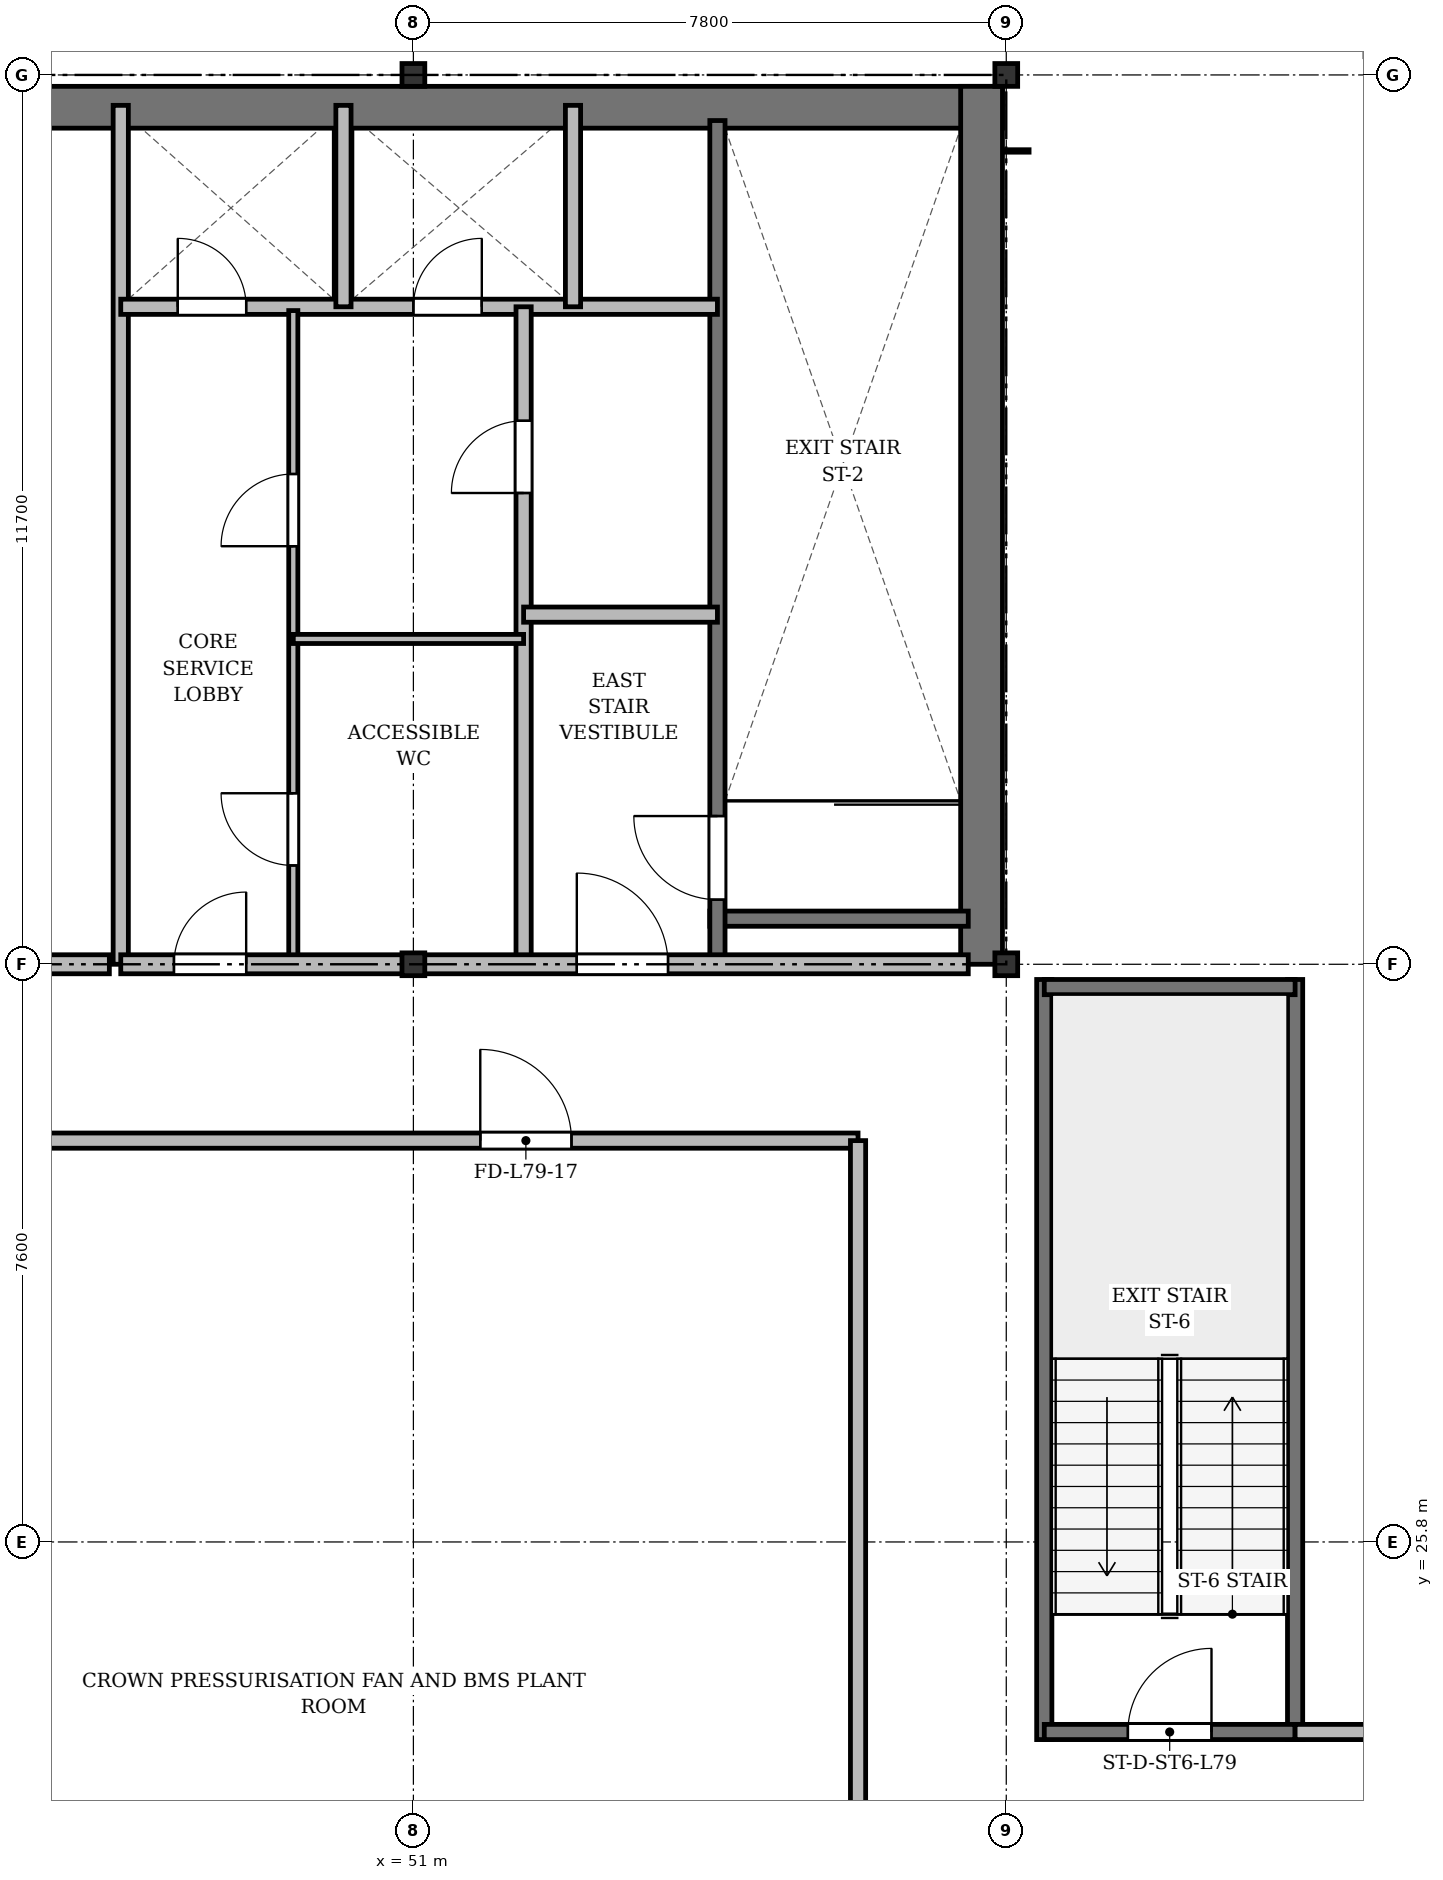
"""IFC4 building model, lengths in metres.
Left out: names, types, materials, properties, quantities, classifications, styles, units other than length and angle.
Written with IfcOpenShell. Run it as: python <this file> out.ifc"""

import sys

from ifc_helpers import new_model, si_unit, direction, frame, frame_2d, origin, origin_2d, place, context, subcontext, project, spatial, rectangle, i_section, extrude, source, transform, mapped, element, fill, save


model = new_model("IFC4")
c1 = context("Model", 3, precision=1e-05, world=origin(), true_north=direction((0.0, 1.0)))
c2 = subcontext(c1, "Body", "Model", "MODEL_VIEW")
j1 = project(units=[si_unit("LENGTHUNIT", "METRE"), si_unit("PLANEANGLEUNIT", "RADIAN")], contexts=[c1])
p1 = place(None, origin())
s1 = spatial("IfcSite", under=j1, at=p1, CompositionType="ELEMENT")
p2 = place(p1, origin())
s2 = spatial("IfcBuilding", under=s1, at=p2, CompositionType="ELEMENT")
p3 = place(p2, frame((0.0, 0.0, 303.5)))
s3 = spatial("IfcBuildingStorey", under=s2, at=p3, CompositionType="ELEMENT", Elevation=303.5)
m1 = source(origin(), c2, "Body", "SweptSolid", [
    extrude(i_section(OverallWidth=0.3, OverallDepth=0.3, WebThickness=0.015, FlangeThickness=0.024, at=origin_2d()), origin(), (0.0, 0.0, 1.0), 4.4),
])
for number, where, z_axis, x_axis in (
    (1, (51.0, 33.4, 0.0), (0.0, 0.0, 1.0), (1.0, 0.0, 0.0)),
    (2, (51.0, 45.1, 0.0), (0.0, 0.0, 1.0), (1.0, 0.0, 0.0)),
    (3, (58.8, 33.4, 0.0), (0.0, 0.0, 1.0), (1.0, 0.0, 0.0)),
    (4, (58.8, 45.1, 0.0), (0.0, 0.0, 1.0), (1.0, 0.0, 0.0)),
):
    element("IfcColumn", number, at=place(p3, frame(where, z_axis=z_axis, x_axis=x_axis)), inside=s3, PredefinedType="COLUMN", context=c2, shape_type="MappedRepresentation", body=[
        mapped(m1, transform((0.0, 0.0, 0.0), x_axis=(1.0, 0.0, 0.0), y_axis=(0.0, 1.0, 0.0), z_axis=(0.0, 0.0, 1.0), scale=1.0)),
    ])
p4 = place(p3, frame((15.65, 44.675, 0.0), z_axis=(0.0, 0.0, 1.0), x_axis=(1.0, 0.0, 0.0)))
e5 = element("IfcWall", 5, at=p4, inside=s3, PredefinedType="SHEAR", context=c2, shape_type="SweptSolid", body=[
    extrude(rectangle(XDim=43.1, YDim=0.55, at=frame_2d((21.55, 0.0))), origin(), (0.0, 0.0, 1.0), 4.1),
])
p5 = place(p3, frame((58.475, 33.4, 0.0), z_axis=(0.0, 0.0, 1.0), x_axis=(0.0, 1.0, 0.0)))
e6 = element("IfcWall", 6, at=p5, inside=s3, PredefinedType="SHEAR", context=c2, shape_type="SweptSolid", body=[
    extrude(rectangle(XDim=11.55, YDim=0.55, at=frame_2d((5.775, 0.0))), origin(), (0.0, 0.0, 1.0), 4.1),
])
p6 = place(p3, frame((54.9, 34.0, 0.0), z_axis=(0.0, 0.0, 1.0), x_axis=(1.0, 0.0, 0.0)))
e7 = element("IfcWall", 7, at=p6, inside=s3, PredefinedType="SHEAR", context=c2, shape_type="SweptSolid", body=[
    extrude(rectangle(XDim=3.4, YDim=0.2, at=frame_2d((1.7, 0.0))), origin(), (0.0, 0.0, 1.0), 4.1),
])
p7 = place(p3, frame((55.0, 33.4, 0.0), z_axis=(0.0, 0.0, 1.0), x_axis=(0.0, 1.0, 0.0)))
e8 = element("IfcWall", 8, at=p7, inside=s3, PredefinedType="SHEAR", context=c2, shape_type="SweptSolid", body=[
    extrude(rectangle(XDim=11.1, YDim=0.2, at=frame_2d((5.55, 0.0))), origin(), (0.0, 0.0, 1.0), 4.1),
])
p8 = place(p7, frame((0.85, 0.0, 0.0)))
e9 = element("IfcOpeningElement", 9, at=p8, cuts=e8, PredefinedType="OPENING", context=c2, shape_type="SweptSolid", body=[
    extrude(rectangle(XDim=1.1, YDim=2.15, at=frame_2d((0.55, 1.075))), frame((0.0, 0.11, 0.0), z_axis=(0.0, -1.0, 0.0), x_axis=(1.0, 0.0, 0.0)), (0.0, 0.0, 1.0), 0.22),
])
for number, where, z_axis, x_axis in (
    (10, (59.3, 23.2, 0.0), (0.0, 0.0, 1.0), (0.0, 1.0, 0.0)),
    (11, (62.6, 23.2, 0.0), (0.0, 0.0, 1.0), (0.0, 1.0, 0.0)),
):
    element("IfcWall", number, at=place(p3, frame(where, z_axis=z_axis, x_axis=x_axis)), inside=s3, PredefinedType="SHEAR", context=c2, shape_type="SweptSolid", body=[
        extrude(rectangle(XDim=10.0, YDim=0.2, at=frame_2d((5.0, 0.0))), origin(), (0.0, 0.0, 1.0), 4.1),
    ])
p9 = place(p3, frame((59.3, 33.1, 0.0), z_axis=(0.0, 0.0, 1.0), x_axis=(1.0, 0.0, 0.0)))
e12 = element("IfcWall", 12, at=p9, inside=s3, PredefinedType="SHEAR", context=c2, shape_type="SweptSolid", body=[
    extrude(rectangle(XDim=3.3, YDim=0.2, at=frame_2d((1.65, 0.0))), origin(), (0.0, 0.0, 1.0), 4.1),
])
p10 = place(p3, frame((59.3, 23.3, 0.0), z_axis=(0.0, 0.0, 1.0), x_axis=(1.0, 0.0, 0.0)))
e13 = element("IfcWall", 13, at=p10, inside=s3, PredefinedType="SHEAR", context=c2, shape_type="SweptSolid", body=[
    extrude(rectangle(XDim=3.3, YDim=0.2, at=frame_2d((1.65, 0.0))), origin(), (0.0, 0.0, 1.0), 4.1),
])
p11 = place(p10, frame((1.1, 0.0, 0.0)))
e14 = element("IfcOpeningElement", 14, at=p11, cuts=e13, PredefinedType="OPENING", context=c2, shape_type="SweptSolid", body=[
    extrude(rectangle(XDim=1.1, YDim=2.15, at=frame_2d((0.55, 1.075))), frame((0.0, 0.11, 0.0), z_axis=(0.0, -1.0, 0.0), x_axis=(1.0, 0.0, 0.0)), (0.0, 0.0, 1.0), 0.22),
])
p12 = place(p3, frame((26.3, 33.4, 0.0), z_axis=(0.0, 0.0, 1.0), x_axis=(1.0, 0.0, 0.0)))
e15 = element("IfcWall", 15, at=p12, inside=s3, PredefinedType="PARTITIONING", context=c2, shape_type="SweptSolid", body=[
    extrude(rectangle(XDim=20.7, YDim=0.25, at=frame_2d((10.35, 0.0))), origin(), (0.0, 0.0, 1.0), 3.6),
])
p13 = place(p12, frame((2.0, 0.0, 0.0)))
e16 = element("IfcOpeningElement", 16, at=p13, cuts=e15, PredefinedType="OPENING", context=c2, shape_type="SweptSolid", body=[
    extrude(rectangle(XDim=1.6, YDim=2.2, at=frame_2d((0.8, 1.1))), frame((0.0, 0.135, 0.0), z_axis=(0.0, -1.0, 0.0), x_axis=(1.0, 0.0, 0.0)), (0.0, 0.0, 1.0), 0.27),
])
p14 = place(p3, frame((47.15, 33.4, 0.0), z_axis=(0.0, 0.0, 1.0), x_axis=(0.0, 1.0, 0.0)))
e17 = element("IfcWall", 17, at=p14, inside=s3, PredefinedType="SOLIDWALL", context=c2, shape_type="SweptSolid", body=[
    extrude(rectangle(XDim=11.3, YDim=0.2, at=frame_2d((5.65, 0.0))), origin(), (0.0, 0.0, 1.0), 3.6),
])
p15 = place(p3, frame((47.15, 42.05, 0.0), z_axis=(0.0, 0.0, 1.0), x_axis=(1.0, 0.0, 0.0)))
e18 = element("IfcWall", 18, at=p15, inside=s3, PredefinedType="SOLIDWALL", context=c2, shape_type="SweptSolid", body=[
    extrude(rectangle(XDim=7.85, YDim=0.2, at=frame_2d((3.925, 0.0))), origin(), (0.0, 0.0, 1.0), 3.6),
])
p16 = place(p15, frame((0.75, 0.0, 0.0)))
e19 = element("IfcOpeningElement", 19, at=p16, cuts=e18, PredefinedType="OPENING", context=c2, shape_type="SweptSolid", body=[
    extrude(rectangle(XDim=0.9, YDim=2.1, at=frame_2d((0.45, 1.05))), frame((0.0, 0.11, 0.0), z_axis=(0.0, -1.0, 0.0), x_axis=(1.0, 0.0, 0.0)), (0.0, 0.0, 1.0), 0.22),
])
p17 = place(p15, frame((3.85, 0.0, 0.0)))
e20 = element("IfcOpeningElement", 20, at=p17, cuts=e18, PredefinedType="OPENING", context=c2, shape_type="SweptSolid", body=[
    extrude(rectangle(XDim=0.9, YDim=2.1, at=frame_2d((0.45, 1.05))), frame((0.0, 0.11, 0.0), z_axis=(0.0, -1.0, 0.0), x_axis=(1.0, 0.0, 0.0)), (0.0, 0.0, 1.0), 0.22),
])
for number, where, z_axis, x_axis in (
    (21, (50.08, 42.05, 0.0), (0.0, 0.0, 1.0), (0.0, 1.0, 0.0)),
    (22, (53.1, 42.05, 0.0), (0.0, 0.0, 1.0), (0.0, 1.0, 0.0)),
):
    element("IfcWall", number, at=place(p3, frame(where, z_axis=z_axis, x_axis=x_axis)), inside=s3, PredefinedType="SOLIDWALL", context=c2, shape_type="SweptSolid", body=[
        extrude(rectangle(XDim=2.65, YDim=0.2, at=frame_2d((1.325, 0.0))), origin(), (0.0, 0.0, 1.0), 4.1),
    ])
p18 = place(p3, frame((52.45, 33.4, 0.0), z_axis=(0.0, 0.0, 1.0), x_axis=(0.0, 1.0, 0.0)))
e23 = element("IfcWall", 23, at=p18, inside=s3, PredefinedType="PARTITIONING", context=c2, shape_type="SweptSolid", body=[
    extrude(rectangle(XDim=8.65, YDim=0.2, at=frame_2d((4.325, 0.0))), origin(), (0.0, 0.0, 1.0), 3.6),
])
p19 = place(p18, frame((6.2, 0.0, 0.0)))
e24 = element("IfcOpeningElement", 24, at=p19, cuts=e23, PredefinedType="OPENING", context=c2, shape_type="SweptSolid", body=[
    extrude(rectangle(XDim=0.95, YDim=2.15, at=frame_2d((0.475, 1.075))), frame((0.0, 0.11, 0.0), z_axis=(0.0, -1.0, 0.0), x_axis=(1.0, 0.0, 0.0)), (0.0, 0.0, 1.0), 0.22),
])
p20 = place(p3, frame((52.45, 38.0, 0.0), z_axis=(0.0, 0.0, 1.0), x_axis=(1.0, 0.0, 0.0)))
e25 = element("IfcWall", 25, at=p20, inside=s3, PredefinedType="PARTITIONING", context=c2, shape_type="SweptSolid", body=[
    extrude(rectangle(XDim=2.55, YDim=0.2, at=frame_2d((1.275, 0.0))), origin(), (0.0, 0.0, 1.0), 4.1),
])
p21 = place(p3, frame((49.42, 33.4, 0.0), z_axis=(0.0, 0.0, 1.0), x_axis=(0.0, 1.0, 0.0)))
e26 = element("IfcWall", 26, at=p21, inside=s3, PredefinedType="PARTITIONING", context=c2, shape_type="SweptSolid", body=[
    extrude(rectangle(XDim=8.6, YDim=0.12, at=frame_2d((4.3, 0.0))), origin(), (0.0, 0.0, 1.0), 3.6),
])
p22 = place(p21, frame((1.3, 0.0, 0.0)))
e27 = element("IfcOpeningElement", 27, at=p22, cuts=e26, PredefinedType="OPENING", context=c2, shape_type="SweptSolid", body=[
    extrude(rectangle(XDim=0.95, YDim=2.15, at=frame_2d((0.475, 1.075))), frame((0.0, 0.07, 0.0), z_axis=(0.0, -1.0, 0.0), x_axis=(1.0, 0.0, 0.0)), (0.0, 0.0, 1.0), 0.14),
])
p23 = place(p21, frame((5.5, 0.0, 0.0)))
e28 = element("IfcOpeningElement", 28, at=p23, cuts=e26, PredefinedType="OPENING", context=c2, shape_type="SweptSolid", body=[
    extrude(rectangle(XDim=0.95, YDim=2.15, at=frame_2d((0.475, 1.075))), frame((0.0, 0.07, 0.0), z_axis=(0.0, -1.0, 0.0), x_axis=(1.0, 0.0, 0.0)), (0.0, 0.0, 1.0), 0.14),
])
p24 = place(p3, frame((49.42, 37.68, 0.0), z_axis=(0.0, 0.0, 1.0), x_axis=(1.0, 0.0, 0.0)))
e29 = element("IfcWall", 29, at=p24, inside=s3, PredefinedType="PARTITIONING", context=c2, shape_type="SweptSolid", body=[
    extrude(rectangle(XDim=3.03, YDim=0.12, at=frame_2d((1.515, 0.0))), origin(), (0.0, 0.0, 1.0), 3.6),
])
p25 = place(p3, frame((47.15, 33.4, 0.0), z_axis=(0.0, 0.0, 1.0), x_axis=(1.0, 0.0, 0.0)))
e30 = element("IfcWall", 30, at=p25, inside=s3, PredefinedType="PARTITIONING", context=c2, shape_type="SweptSolid", body=[
    extrude(rectangle(XDim=11.15, YDim=0.25, at=frame_2d((5.575, 0.0))), origin(), (0.0, 0.0, 1.0), 3.6),
])
p26 = place(p25, frame((0.7, 0.0, 0.0)))
e31 = element("IfcOpeningElement", 31, at=p26, cuts=e30, PredefinedType="OPENING", context=c2, shape_type="SweptSolid", body=[
    extrude(rectangle(XDim=0.95, YDim=2.15, at=frame_2d((0.475, 1.075))), frame((0.0, 0.135, 0.0), z_axis=(0.0, -1.0, 0.0), x_axis=(1.0, 0.0, 0.0)), (0.0, 0.0, 1.0), 0.27),
])
p27 = place(p25, frame((6.0, 0.0, 0.0)))
e32 = element("IfcOpeningElement", 32, at=p27, cuts=e30, PredefinedType="OPENING", context=c2, shape_type="SweptSolid", body=[
    extrude(rectangle(XDim=1.2, YDim=2.15, at=frame_2d((0.6, 1.075))), frame((0.0, 0.135, 0.0), z_axis=(0.0, -1.0, 0.0), x_axis=(1.0, 0.0, 0.0)), (0.0, 0.0, 1.0), 0.27),
])
p28 = place(p3, frame((42.38, 31.08, 0.0), z_axis=(0.0, 0.0, 1.0), x_axis=(1.0, 0.0, 0.0)))
e33 = element("IfcWall", 33, at=p28, inside=s3, PredefinedType="PARTITIONING", context=c2, shape_type="SweptSolid", body=[
    extrude(rectangle(XDim=14.47, YDim=0.2, at=frame_2d((7.235, 0.0))), origin(), (0.0, 0.0, 1.0), 3.6),
])
p29 = place(p28, frame((9.5, 0.0, 0.0)))
e34 = element("IfcOpeningElement", 34, at=p29, cuts=e33, PredefinedType="OPENING", context=c2, shape_type="SweptSolid", body=[
    extrude(rectangle(XDim=1.2, YDim=2.15, at=frame_2d((0.6, 1.075))), frame((0.0, 0.11, 0.0), z_axis=(0.0, -1.0, 0.0), x_axis=(1.0, 0.0, 0.0)), (0.0, 0.0, 1.0), 0.22),
])
p30 = place(p3, frame((56.85, 15.01, 0.0), z_axis=(0.0, 0.0, 1.0), x_axis=(0.0, 1.0, 0.0)))
e35 = element("IfcWall", 35, at=p30, inside=s3, PredefinedType="PARTITIONING", context=c2, shape_type="SweptSolid", body=[
    extrude(rectangle(XDim=16.07, YDim=0.2, at=frame_2d((8.035, 0.0))), origin(), (0.0, 0.0, 1.0), 3.6),
])
p31 = place(p3, frame((62.6, 23.3, 0.0), z_axis=(0.0, 0.0, 1.0), x_axis=(1.0, 0.0, 0.0)))
e36 = element("IfcWall", 36, at=p31, inside=s3, PredefinedType="PARTITIONING", context=c2, shape_type="SweptSolid", body=[
    extrude(rectangle(XDim=3.39, YDim=0.2, at=frame_2d((1.695, 0.0))), origin(), (0.0, 0.0, 1.0), 3.6),
])
p32 = place(p31, frame((1.1, 0.0, 0.0)))
e37 = element("IfcOpeningElement", 37, at=p32, cuts=e36, PredefinedType="OPENING", context=c2, shape_type="SweptSolid", body=[
    extrude(rectangle(XDim=1.2, YDim=2.15, at=frame_2d((0.6, 1.075))), frame((0.0, 0.11, 0.0), z_axis=(0.0, -1.0, 0.0), x_axis=(1.0, 0.0, 0.0)), (0.0, 0.0, 1.0), 0.22),
])
m2 = source(origin(), c2, "Body", "SweptSolid", [
    extrude(rectangle(XDim=1.1, YDim=2.15, at=frame_2d((0.55, 1.075))), frame((0.0, 0.025, 0.0), z_axis=(0.0, -1.0, 0.0), x_axis=(1.0, 0.0, 0.0)), (0.0, 0.0, 1.0), 0.05),
])
p33 = place(p8, origin())
e38 = element("IfcDoor", 38, at=p33, inside=s3, OperationType="SINGLE_SWING_RIGHT", PredefinedType="DOOR", context=c2, shape_type="MappedRepresentation", body=[
    mapped(m2, transform((0.0, 0.0, 0.0), x_axis=(1.0, 0.0, 0.0), y_axis=(0.0, 1.0, 0.0), z_axis=(0.0, 0.0, 1.0), scale=1.0)),
])
fill(e9, e38)
p34 = place(p11, origin())
e39 = element("IfcDoor", 39, at=p34, inside=s3, OperationType="SINGLE_SWING_RIGHT", PredefinedType="DOOR", context=c2, shape_type="MappedRepresentation", body=[
    mapped(m2, transform((0.0, 0.0, 0.0), x_axis=(1.0, 0.0, 0.0), y_axis=(0.0, 1.0, 0.0), z_axis=(0.0, 0.0, 1.0), scale=1.0)),
])
fill(e14, e39)
m3 = source(origin(), c2, "Body", "SweptSolid", [
    extrude(rectangle(XDim=0.9, YDim=2.1, at=frame_2d((0.45, 1.05))), frame((0.0, 0.025, 0.0), z_axis=(0.0, -1.0, 0.0), x_axis=(1.0, 0.0, 0.0)), (0.0, 0.0, 1.0), 0.05),
])
p35 = place(p16, origin())
e40 = element("IfcDoor", 40, at=p35, inside=s3, OperationType="SINGLE_SWING_LEFT", PredefinedType="DOOR", context=c2, shape_type="MappedRepresentation", body=[
    mapped(m3, transform((0.0, 0.0, 0.0), x_axis=(1.0, 0.0, 0.0), y_axis=(0.0, 1.0, 0.0), z_axis=(0.0, 0.0, 1.0), scale=1.0)),
])
fill(e19, e40)
p36 = place(p17, origin())
e41 = element("IfcDoor", 41, at=p36, inside=s3, OperationType="SINGLE_SWING_RIGHT", PredefinedType="DOOR", context=c2, shape_type="MappedRepresentation", body=[
    mapped(m3, transform((0.0, 0.0, 0.0), x_axis=(1.0, 0.0, 0.0), y_axis=(0.0, 1.0, 0.0), z_axis=(0.0, 0.0, 1.0), scale=1.0)),
])
fill(e20, e41)
m4 = source(origin(), c2, "Body", "SweptSolid", [
    extrude(rectangle(XDim=0.95, YDim=2.15, at=frame_2d((0.475, 1.075))), frame((0.0, 0.025, 0.0), z_axis=(0.0, -1.0, 0.0), x_axis=(1.0, 0.0, 0.0)), (0.0, 0.0, 1.0), 0.05),
])
p37 = place(p19, origin())
e42 = element("IfcDoor", 42, at=p37, inside=s3, OperationType="SINGLE_SWING_LEFT", PredefinedType="DOOR", context=c2, shape_type="MappedRepresentation", body=[
    mapped(m4, transform((0.0, 0.0, 0.0), x_axis=(1.0, 0.0, 0.0), y_axis=(0.0, 1.0, 0.0), z_axis=(0.0, 0.0, 1.0), scale=1.0)),
])
fill(e24, e42)
p38 = place(p22, origin())
e43 = element("IfcDoor", 43, at=p38, inside=s3, OperationType="SINGLE_SWING_RIGHT", PredefinedType="DOOR", context=c2, shape_type="MappedRepresentation", body=[
    mapped(m4, transform((0.0, 0.0, 0.0), x_axis=(1.0, 0.0, 0.0), y_axis=(0.0, 1.0, 0.0), z_axis=(0.0, 0.0, 1.0), scale=1.0)),
])
fill(e27, e43)
p39 = place(p23, origin())
e44 = element("IfcDoor", 44, at=p39, inside=s3, OperationType="SINGLE_SWING_LEFT", PredefinedType="DOOR", context=c2, shape_type="MappedRepresentation", body=[
    mapped(m4, transform((0.0, 0.0, 0.0), x_axis=(1.0, 0.0, 0.0), y_axis=(0.0, 1.0, 0.0), z_axis=(0.0, 0.0, 1.0), scale=1.0)),
])
fill(e28, e44)
p40 = place(p26, origin())
e45 = element("IfcDoor", 45, at=p40, inside=s3, OperationType="SINGLE_SWING_RIGHT", PredefinedType="DOOR", context=c2, shape_type="MappedRepresentation", body=[
    mapped(m4, transform((0.0, 0.0, 0.0), x_axis=(1.0, 0.0, 0.0), y_axis=(0.0, 1.0, 0.0), z_axis=(0.0, 0.0, 1.0), scale=1.0)),
])
fill(e31, e45)
m5 = source(origin(), c2, "Body", "SweptSolid", [
    extrude(rectangle(XDim=1.2, YDim=2.15, at=frame_2d((0.6, 1.075))), frame((0.0, 0.025, 0.0), z_axis=(0.0, -1.0, 0.0), x_axis=(1.0, 0.0, 0.0)), (0.0, 0.0, 1.0), 0.05),
])
p41 = place(p27, origin())
e46 = element("IfcDoor", 46, at=p41, inside=s3, OperationType="SINGLE_SWING_LEFT", PredefinedType="DOOR", context=c2, shape_type="MappedRepresentation", body=[
    mapped(m5, transform((0.0, 0.0, 0.0), x_axis=(1.0, 0.0, 0.0), y_axis=(0.0, 1.0, 0.0), z_axis=(0.0, 0.0, 1.0), scale=1.0)),
])
fill(e32, e46)
p42 = place(p29, origin())
e47 = element("IfcDoor", 47, at=p42, inside=s3, OperationType="SINGLE_SWING_LEFT", PredefinedType="DOOR", context=c2, shape_type="MappedRepresentation", body=[
    mapped(m5, transform((0.0, 0.0, 0.0), x_axis=(1.0, 0.0, 0.0), y_axis=(0.0, 1.0, 0.0), z_axis=(0.0, 0.0, 1.0), scale=1.0)),
])
fill(e34, e47)
save(model, sys.argv[1])
